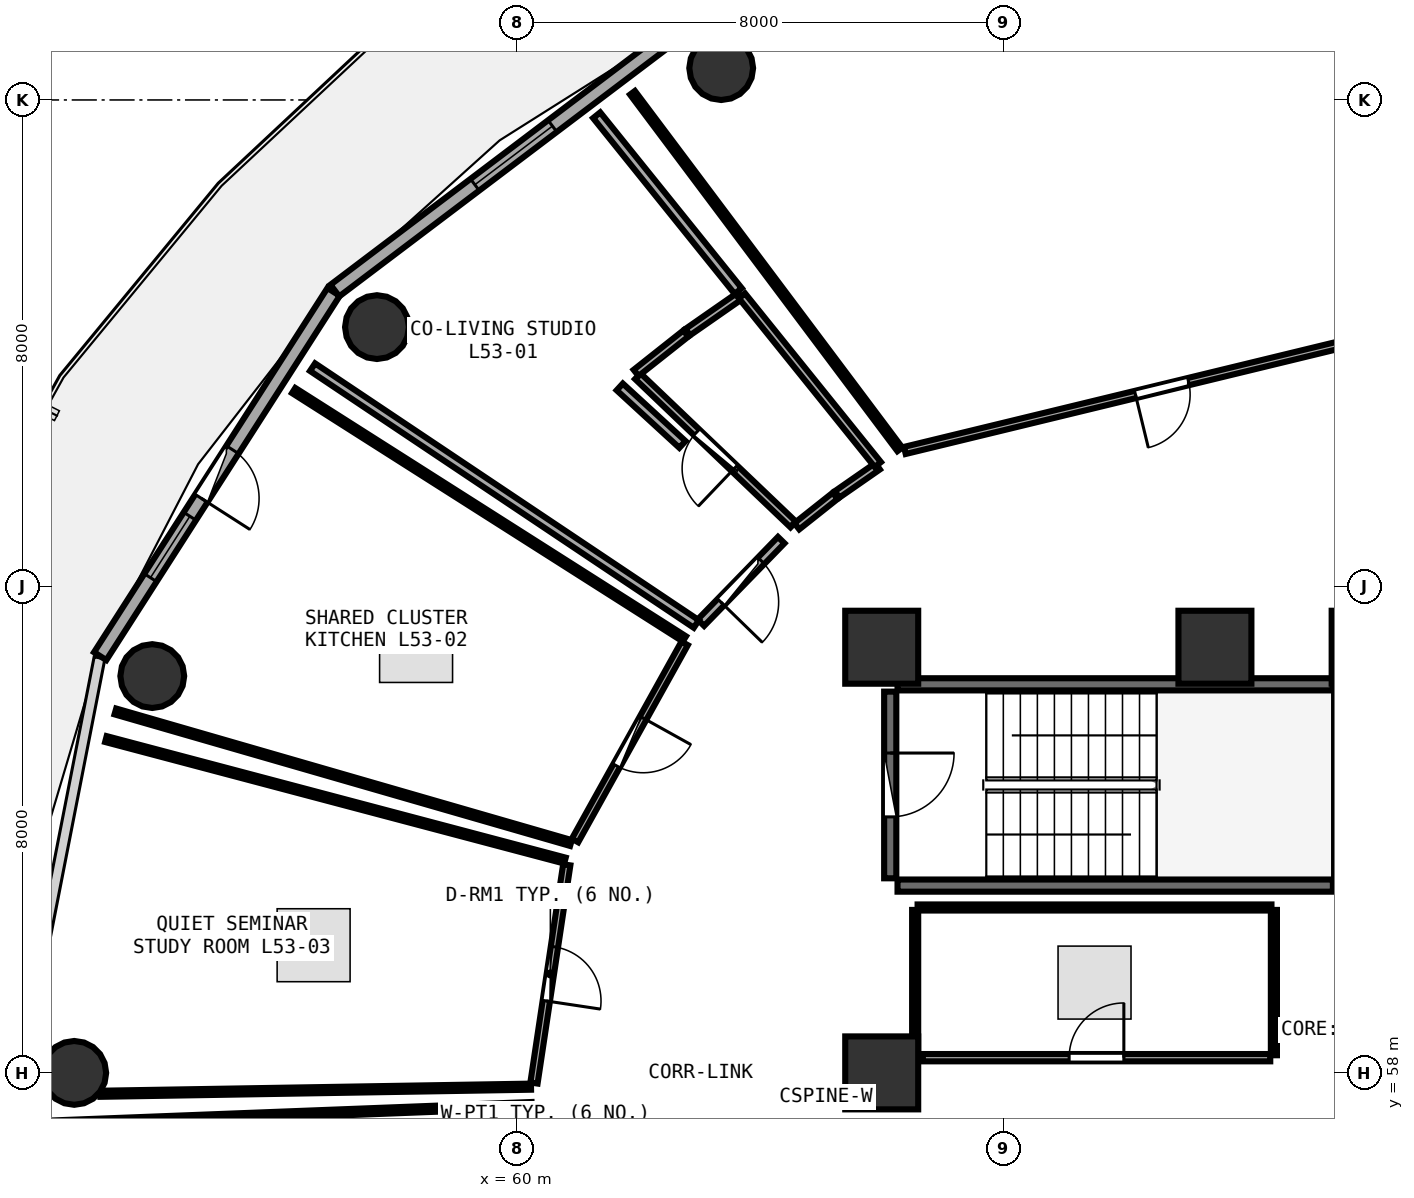
"""IFC4 building model, lengths in metres.
Left out: names, types, materials, properties, quantities, classifications, styles, units other than length and angle.
Written with IfcOpenShell. Run it as: python <this file> out.ifc"""

import sys

from ifc_helpers import new_model, si_unit, direction, frame, frame_2d, origin, origin_2d, place, context, subcontext, project, spatial, rectangle, circle, extrude, element, fill, save


model = new_model("IFC4")
c1 = context("Model", 3, precision=1e-05, world=origin(), true_north=direction((0.0, 1.0)))
c2 = subcontext(c1, "Body", "Model", "MODEL_VIEW")
j1 = project(units=[si_unit("LENGTHUNIT", "METRE"), si_unit("PLANEANGLEUNIT", "RADIAN")], contexts=[c1])
p1 = place(None, origin())
s1 = spatial("IfcSite", under=j1, at=p1, CompositionType="ELEMENT")
p2 = place(p1, origin())
s2 = spatial("IfcBuilding", under=s1, at=p2, CompositionType="ELEMENT")
p3 = place(p2, frame((0.0, 0.0, 208.2)))
s3 = spatial("IfcBuildingStorey", under=s2, at=p3, CompositionType="ELEMENT", Elevation=208.2)
for number, where, z_axis, x_axis in (
    (1, (74.0, 65.0, 0.0), (0.0, 0.0, 1.0), (1.0, 0.0, 0.0)),
    (2, (71.48, 65.0, 0.0), (0.0, 0.0, 1.0), (1.0, 0.0, 0.0)),
    (3, (66.0, 65.0, 0.0), (0.0, 0.0, 1.0), (1.0, 0.0, 0.0)),
    (4, (66.0, 58.0, 0.0), (0.0, 0.0, 1.0), (1.0, 0.0, 0.0)),
):
    element("IfcColumn", number, at=place(p3, frame(where, z_axis=z_axis, x_axis=x_axis)), inside=s3, PredefinedType="PILASTER", context=c2, shape_type="SweptSolid", body=[
        extrude(rectangle(XDim=1.2, YDim=1.2, at=origin_2d()), origin(), (0.0, 0.0, 1.0), 3.75),
    ])
for number, where, z_axis, x_axis in (
    (5, (63.36, 74.524, 0.0), (0.0, 0.0, 1.0), (1.0, 0.0, 0.0)),
    (6, (57.698, 70.264, 0.0), (0.0, 0.0, 1.0), (1.0, 0.0, 0.0)),
    (7, (54.003, 64.526, 0.0), (0.0, 0.0, 1.0), (1.0, 0.0, 0.0)),
    (8, (52.72, 58.0, 0.0), (0.0, 0.0, 1.0), (1.0, 0.0, 0.0)),
):
    element("IfcColumn", number, at=place(p3, frame(where, z_axis=z_axis, x_axis=x_axis)), inside=s3, PredefinedType="COLUMN", context=c2, shape_type="SweptSolid", body=[
        extrude(circle(Radius=0.525, at=origin_2d()), origin(), (0.0, 0.0, 1.0), 3.75),
    ])
p4 = place(p3, frame((62.888, 75.312, 0.0), z_axis=(0.0, 0.0, 1.0), x_axis=(-0.797701674595, -0.603052268338, 0.0)))
e9 = element("IfcWall", 9, at=p4, inside=s3, PredefinedType="SOLIDWALL", context=c2, shape_type="SweptSolid", body=[
    extrude(rectangle(XDim=7.374, YDim=0.24, at=frame_2d((3.687, 0.0))), origin(), (0.0, 0.0, 1.0), 3.475),
])
p5 = place(p4, frame((2.887, 0.0, 0.85)))
e10 = element("IfcOpeningElement", 10, at=p5, cuts=e9, PredefinedType="OPENING", context=c2, shape_type="SweptSolid", body=[
    extrude(rectangle(XDim=1.6, YDim=1.45, at=frame_2d((0.8, 0.725))), frame((0.0, 0.13, 0.0), z_axis=(0.0, -1.0, 0.0), x_axis=(1.0, 0.0, 0.0)), (0.0, 0.0, 1.0), 0.26),
])
p6 = place(p3, frame((56.986, 70.843, 0.0), z_axis=(0.0, 0.0, 1.0), x_axis=(-0.539539512973, -0.841960280501, 0.0)))
e11 = element("IfcWall", 11, at=p6, inside=s3, PredefinedType="SOLIDWALL", context=c2, shape_type="SweptSolid", body=[
    extrude(rectangle(XDim=7.115, YDim=0.24, at=frame_2d((3.557, 0.0))), origin(), (0.0, 0.0, 1.0), 3.475),
])
p7 = place(p6, frame((3.082, 0.0, 0.0)))
e12 = element("IfcOpeningElement", 12, at=p7, cuts=e11, PredefinedType="OPENING", context=c2, shape_type="SweptSolid", body=[
    extrude(rectangle(XDim=0.95, YDim=2.1, at=frame_2d((0.475, 1.05))), frame((0.0, 0.13, 0.0), z_axis=(0.0, -1.0, 0.0), x_axis=(1.0, 0.0, 0.0)), (0.0, 0.0, 1.0), 0.26),
])
p8 = place(p6, frame((4.382, 0.0, 0.85)))
e13 = element("IfcOpeningElement", 13, at=p8, cuts=e11, PredefinedType="OPENING", context=c2, shape_type="SweptSolid", body=[
    extrude(rectangle(XDim=1.2, YDim=1.45, at=frame_2d((0.6, 0.725))), frame((0.0, 0.13, 0.0), z_axis=(0.0, -1.0, 0.0), x_axis=(1.0, 0.0, 0.0)), (0.0, 0.0, 1.0), 0.26),
])
p9 = place(p3, frame((51.803, 57.985, 0.0), z_axis=(0.0, 0.0, 1.0), x_axis=(0.192069055673, -0.981381413036, 0.0)))
e14 = element("IfcWall", 14, at=p9, inside=s3, PredefinedType="SOLIDWALL", context=c2, shape_type="SweptSolid", body=[
    extrude(rectangle(XDim=6.94, YDim=0.24, at=frame_2d((3.47, 0.0))), origin(), (0.0, 0.0, 1.0), 3.475),
])
p10 = place(p9, frame((2.67, 0.0, 0.85)))
e15 = element("IfcOpeningElement", 15, at=p10, cuts=e14, PredefinedType="OPENING", context=c2, shape_type="SweptSolid", body=[
    extrude(rectangle(XDim=1.6, YDim=1.45, at=frame_2d((0.8, 0.725))), frame((0.0, 0.13, 0.0), z_axis=(0.0, -1.0, 0.0), x_axis=(1.0, 0.0, 0.0)), (0.0, 0.0, 1.0), 0.26),
])
p11 = place(p3, frame((66.26, 61.08, 0.0), z_axis=(0.0, 0.0, 1.0), x_axis=(1.0, 0.0, 0.0)))
e16 = element("IfcWall", 16, at=p11, inside=s3, PredefinedType="SHEAR", context=c2, shape_type="SweptSolid", body=[
    extrude(rectangle(XDim=7.16, YDim=0.2, at=frame_2d((3.58, 0.0))), origin(), (0.0, 0.0, 1.0), 3.49),
])
p12 = place(p3, frame((73.54, 61.2, 0.0), z_axis=(0.0, 0.0, 1.0), x_axis=(0.0, 1.0, 0.0)))
e17 = element("IfcWall", 17, at=p12, inside=s3, PredefinedType="SHEAR", context=c2, shape_type="SweptSolid", body=[
    extrude(rectangle(XDim=3.07, YDim=0.2, at=frame_2d((1.535, 0.0))), origin(), (0.0, 0.0, 1.0), 3.49),
])
p13 = place(p3, frame((73.42, 64.39, 0.0), z_axis=(0.0, 0.0, 1.0), x_axis=(-1.0, 0.0, 0.0)))
e18 = element("IfcWall", 18, at=p13, inside=s3, PredefinedType="SHEAR", context=c2, shape_type="SweptSolid", body=[
    extrude(rectangle(XDim=7.16, YDim=0.2, at=frame_2d((3.58, 0.0))), origin(), (0.0, 0.0, 1.0), 3.49),
])
p14 = place(p3, frame((66.14, 64.27, 0.0), z_axis=(0.0, 0.0, 1.0), x_axis=(0.0, -1.0, 0.0)))
e19 = element("IfcWall", 19, at=p14, inside=s3, PredefinedType="SHEAR", context=c2, shape_type="SweptSolid", body=[
    extrude(rectangle(XDim=3.07, YDim=0.2, at=frame_2d((1.535, 0.0))), origin(), (0.0, 0.0, 1.0), 3.49),
])
p15 = place(p14, frame((1.01, 0.0, 0.0)))
e20 = element("IfcOpeningElement", 20, at=p15, cuts=e19, PredefinedType="OPENING", context=c2, shape_type="SweptSolid", body=[
    extrude(rectangle(XDim=1.05, YDim=2.1, at=frame_2d((0.525, 1.05))), frame((0.0, 0.11, 0.0), z_axis=(0.0, -1.0, 0.0), x_axis=(1.0, 0.0, 0.0)), (0.0, 0.0, 1.0), 0.22),
])
p16 = place(p3, frame((66.675, 58.25, 0.0), z_axis=(0.0, 0.0, 1.0), x_axis=(1.0, 0.0, 0.0)))
e21 = element("IfcWall", 21, at=p16, inside=s3, PredefinedType="PARTITIONING", context=c2, shape_type="SweptSolid", body=[
    extrude(rectangle(XDim=5.715, YDim=0.12, at=frame_2d((2.857, 0.0))), origin(), (0.0, 0.0, 1.0), 3.48),
])
p17 = place(p16, frame((2.407, 0.0, 0.0)))
e22 = element("IfcOpeningElement", 22, at=p17, cuts=e21, PredefinedType="OPENING", context=c2, shape_type="SweptSolid", body=[
    extrude(rectangle(XDim=0.9, YDim=2.08, at=frame_2d((0.45, 1.04))), frame((0.0, 0.07, 0.0), z_axis=(0.0, -1.0, 0.0), x_axis=(1.0, 0.0, 0.0)), (0.0, 0.0, 1.0), 0.14),
])
p18 = place(p3, frame((74.84, 70.29, 0.0), z_axis=(0.0, 0.0, 1.0), x_axis=(-0.971771434763, -0.235924306884, 0.0)))
e23 = element("IfcWall", 23, at=p18, inside=s3, PredefinedType="PARTITIONING", context=c2, shape_type="SweptSolid", body=[
    extrude(rectangle(XDim=8.705, YDim=0.12, at=frame_2d((4.353, 0.0))), origin(), (0.0, 0.0, 1.0), 3.025),
])
p19 = place(p18, frame((3.903, 0.0, 0.0)))
e24 = element("IfcOpeningElement", 24, at=p19, cuts=e23, PredefinedType="OPENING", context=c2, shape_type="SweptSolid", body=[
    extrude(rectangle(XDim=0.9, YDim=2.08, at=frame_2d((0.45, 1.04))), frame((0.0, 0.07, 0.0), z_axis=(0.0, -1.0, 0.0), x_axis=(1.0, 0.0, 0.0)), (0.0, 0.0, 1.0), 0.14),
])
p20 = place(p3, frame((64.545, 67.018, 0.0), z_axis=(0.0, 0.0, 1.0), x_axis=(-0.723495138875, 0.690329474979, 0.0)))
e25 = element("IfcWall", 25, at=p20, inside=s3, PredefinedType="PLUMBINGWALL", context=c2, shape_type="SweptSolid", body=[
    extrude(rectangle(XDim=3.533, YDim=0.13, at=frame_2d((1.767, 0.0))), origin(), (0.0, 0.0, 1.0), 3.175),
])
p21 = place(p20, frame((1.337, 0.0, 0.0)))
e26 = element("IfcOpeningElement", 26, at=p21, cuts=e25, PredefinedType="OPENING", context=c2, shape_type="SweptSolid", body=[
    extrude(rectangle(XDim=0.86, YDim=2.05, at=frame_2d((0.43, 1.025))), frame((0.0, 0.075, 0.0), z_axis=(0.0, -1.0, 0.0), x_axis=(1.0, 0.0, 0.0)), (0.0, 0.0, 1.0), 0.15),
])
p22 = place(p3, frame((64.347, 66.762, 0.0), z_axis=(0.0, 0.0, 1.0), x_axis=(-0.697118859216, -0.716955574722, 0.0)))
e27 = element("IfcWall", 27, at=p22, inside=s3, PredefinedType="PARTITIONING", context=c2, shape_type="SweptSolid", body=[
    extrude(rectangle(XDim=1.895, YDim=0.15, at=frame_2d((0.948, 0.0))), origin(), (0.0, 0.0, 1.0), 3.025),
])
p23 = place(p22, frame((0.473, 0.0, 0.0)))
e28 = element("IfcOpeningElement", 28, at=p23, cuts=e27, PredefinedType="OPENING", context=c2, shape_type="SweptSolid", body=[
    extrude(rectangle(XDim=0.95, YDim=2.08, at=frame_2d((0.475, 1.04))), frame((0.0, 0.085, 0.0), z_axis=(0.0, -1.0, 0.0), x_axis=(1.0, 0.0, 0.0)), (0.0, 0.0, 1.0), 0.17),
])
p24 = place(p3, frame((62.759, 65.064, 0.0), z_axis=(0.0, 0.0, 1.0), x_axis=(-0.485877595764, -0.874026865683, 0.0)))
e29 = element("IfcWall", 29, at=p24, inside=s3, PredefinedType="PARTITIONING", context=c2, shape_type="SweptSolid", body=[
    extrude(rectangle(XDim=3.71, YDim=0.12, at=frame_2d((1.855, 0.0))), origin(), (0.0, 0.0, 1.0), 3.025),
])
p25 = place(p24, frame((1.405, 0.0, 0.0)))
e30 = element("IfcOpeningElement", 30, at=p25, cuts=e29, PredefinedType="OPENING", context=c2, shape_type="SweptSolid", body=[
    extrude(rectangle(XDim=0.9, YDim=2.08, at=frame_2d((0.45, 1.04))), frame((0.0, 0.07, 0.0), z_axis=(0.0, -1.0, 0.0), x_axis=(1.0, 0.0, 0.0)), (0.0, 0.0, 1.0), 0.14),
])
p26 = place(p3, frame((60.82, 61.422, 0.0), z_axis=(0.0, 0.0, 1.0), x_axis=(-0.148557592641, -0.988903757536, 0.0)))
e31 = element("IfcWall", 31, at=p26, inside=s3, PredefinedType="PARTITIONING", context=c2, shape_type="SweptSolid", body=[
    extrude(rectangle(XDim=3.629, YDim=0.12, at=frame_2d((1.814, 0.0))), origin(), (0.0, 0.0, 1.0), 3.025),
])
p27 = place(p26, frame((1.364, 0.0, 0.0)))
e32 = element("IfcOpeningElement", 32, at=p27, cuts=e31, PredefinedType="OPENING", context=c2, shape_type="SweptSolid", body=[
    extrude(rectangle(XDim=0.9, YDim=2.08, at=frame_2d((0.45, 1.04))), frame((0.0, 0.07, 0.0), z_axis=(0.0, -1.0, 0.0), x_axis=(1.0, 0.0, 0.0)), (0.0, 0.0, 1.0), 0.14),
])
p28 = place(p3, frame((60.296, 57.414, 0.0), z_axis=(0.0, 0.0, 1.0), x_axis=(0.214769597133, -0.976664742963, 0.0)))
e33 = element("IfcWall", 33, at=p28, inside=s3, PredefinedType="PARTITIONING", context=c2, shape_type="SweptSolid", body=[
    extrude(rectangle(XDim=3.638, YDim=0.12, at=frame_2d((1.819, 0.0))), origin(), (0.0, 0.0, 1.0), 3.48),
])
p29 = place(p28, frame((1.369, 0.0, 0.0)))
e34 = element("IfcOpeningElement", 34, at=p29, cuts=e33, PredefinedType="OPENING", context=c2, shape_type="SweptSolid", body=[
    extrude(rectangle(XDim=0.9, YDim=2.08, at=frame_2d((0.45, 1.04))), frame((0.0, 0.07, 0.0), z_axis=(0.0, -1.0, 0.0), x_axis=(1.0, 0.0, 0.0)), (0.0, 0.0, 1.0), 0.14),
])
p30 = place(p3, frame((72.45, 58.29, 0.0), z_axis=(0.0, 0.0, 1.0), x_axis=(0.0, 1.0, 0.0)))
e35 = element("IfcWall", 35, at=p30, inside=s3, PredefinedType="PARTITIONING", context=c2, shape_type="SweptSolid", body=[
    extrude(rectangle(XDim=2.39, YDim=0.1, at=frame_2d((1.195, 0.0))), origin(), (0.0, 0.0, 1.0), 3.48),
])
p31 = place(p3, frame((72.41, 60.72, 0.0), z_axis=(0.0, 0.0, 1.0), x_axis=(-1.0, 0.0, 0.0)))
e36 = element("IfcWall", 36, at=p31, inside=s3, PredefinedType="PARTITIONING", context=c2, shape_type="SweptSolid", body=[
    extrude(rectangle(XDim=5.82, YDim=0.1, at=frame_2d((2.91, 0.0))), origin(), (0.0, 0.0, 1.0), 3.48),
])
p32 = place(p3, frame((66.55, 60.68, 0.0), z_axis=(0.0, 0.0, 1.0), x_axis=(0.0, -1.0, 0.0)))
e37 = element("IfcWall", 37, at=p32, inside=s3, PredefinedType="PARTITIONING", context=c2, shape_type="SweptSolid", body=[
    extrude(rectangle(XDim=2.383, YDim=0.1, at=frame_2d((1.191, 0.0))), origin(), (0.0, 0.0, 1.0), 3.48),
])
p33 = place(p3, frame((66.298, 68.254, 0.0), z_axis=(0.0, 0.0, 1.0), x_axis=(-0.599930714763, 0.80005195924, 0.0)))
e38 = element("IfcWall", 38, at=p33, inside=s3, PredefinedType="PARTITIONING", context=c2, shape_type="SweptSolid", body=[
    extrude(rectangle(XDim=7.33, YDim=0.1, at=frame_2d((3.665, 0.0))), origin(), (0.0, 0.0, 1.0), 3.025),
])
p34 = place(p3, frame((65.933, 67.977, 0.0), z_axis=(0.0, 0.0, 1.0), x_axis=(-0.821107527055, -0.570773535663, 0.0)))
e39 = element("IfcWall", 39, at=p34, inside=s3, PredefinedType="PLUMBINGWALL", context=c2, shape_type="SweptSolid", body=[
    extrude(rectangle(XDim=0.812, YDim=0.13, at=frame_2d((0.406, 0.0))), origin(), (0.0, 0.0, 1.0), 3.025),
])
p35 = place(p3, frame((65.234, 67.49, 0.0), z_axis=(0.0, 0.0, 1.0), x_axis=(-0.783584251465, -0.621285538908, 0.0)))
e40 = element("IfcWall", 40, at=p35, inside=s3, PredefinedType="PLUMBINGWALL", context=c2, shape_type="SweptSolid", body=[
    extrude(rectangle(XDim=0.805, YDim=0.13, at=frame_2d((0.402, 0.0))), origin(), (0.0, 0.0, 1.0), 3.025),
])
p36 = place(p3, frame((61.961, 69.511, 0.0), z_axis=(0.0, 0.0, 1.0), x_axis=(0.784079055359, 0.620660966186, 0.0)))
e41 = element("IfcWall", 41, at=p36, inside=s3, PredefinedType="PLUMBINGWALL", context=c2, shape_type="SweptSolid", body=[
    extrude(rectangle(XDim=1.043, YDim=0.13, at=frame_2d((0.521, 0.0))), origin(), (0.0, 0.0, 1.0), 3.48),
])
p37 = place(p3, frame((62.81, 70.182, 0.0), z_axis=(0.0, 0.0, 1.0), x_axis=(0.820692025527, 0.571370807127, 0.0)))
e42 = element("IfcWall", 42, at=p37, inside=s3, PredefinedType="PLUMBINGWALL", context=c2, shape_type="SweptSolid", body=[
    extrude(rectangle(XDim=1.051, YDim=0.13, at=frame_2d((0.525, 0.0))), origin(), (0.0, 0.0, 1.0), 3.48),
])
p38 = place(p3, frame((63.701, 70.778, 0.0), z_axis=(0.0, 0.0, 1.0), x_axis=(0.627323766187, -0.778758558461, 0.0)))
e43 = element("IfcWall", 43, at=p38, inside=s3, PredefinedType="PLUMBINGWALL", context=c2, shape_type="SweptSolid", body=[
    extrude(rectangle(XDim=3.563, YDim=0.13, at=frame_2d((1.781, 0.0))), origin(), (0.0, 0.0, 1.0), 3.025),
])
p39 = place(p3, frame((62.951, 65.382, 0.0), z_axis=(0.0, 0.0, 1.0), x_axis=(-0.831079650143, 0.556153409697, 0.0)))
e44 = element("IfcWall", 44, at=p39, inside=s3, PredefinedType="PARTITIONING", context=c2, shape_type="SweptSolid", body=[
    extrude(rectangle(XDim=7.594, YDim=0.15, at=frame_2d((3.797, 0.0))), origin(), (0.0, 0.0, 1.0), 3.075),
])
p40 = place(p3, frame((61.312, 73.749, 0.0), z_axis=(0.0, 0.0, 1.0), x_axis=(0.627090198143, -0.778946649901, 0.0)))
e45 = element("IfcWall", 45, at=p40, inside=s3, PredefinedType="PARTITIONING", context=c2, shape_type="SweptSolid", body=[
    extrude(rectangle(XDim=3.712, YDim=0.15, at=frame_2d((1.856, 0.0))), origin(), (0.0, 0.0, 1.0), 3.075),
])
p41 = place(p3, frame((61.691, 69.281, 0.0), z_axis=(0.0, 0.0, 1.0), x_axis=(0.736726740779, -0.676190586611, 0.0)))
e46 = element("IfcWall", 46, at=p41, inside=s3, PredefinedType="PARTITIONING", context=c2, shape_type="SweptSolid", body=[
    extrude(rectangle(XDim=1.399, YDim=0.15, at=frame_2d((0.7, 0.0))), origin(), (0.0, 0.0, 1.0), 3.175),
])
p42 = place(p3, frame((60.889, 61.78, 0.0), z_axis=(0.0, 0.0, 1.0), x_axis=(-0.960734399679, 0.277469661899, 0.0)))
e47 = element("IfcWall", 47, at=p42, inside=s3, PredefinedType="PARTITIONING", context=c2, shape_type="SweptSolid", body=[
    extrude(rectangle(XDim=7.798, YDim=0.1, at=frame_2d((3.899, 0.0))), origin(), (0.0, 0.0, 1.0), 3.075),
])
p43 = place(p3, frame((56.329, 69.221, 0.0), z_axis=(0.0, 0.0, 1.0), x_axis=(0.843949218332, -0.536423076383, 0.0)))
e48 = element("IfcWall", 48, at=p43, inside=s3, PredefinedType="PARTITIONING", context=c2, shape_type="SweptSolid", body=[
    extrude(rectangle(XDim=7.613, YDim=0.1, at=frame_2d((3.807, 0.0))), origin(), (0.0, 0.0, 1.0), 3.075),
])
p44 = place(p3, frame((60.232, 57.773, 0.0), z_axis=(0.0, 0.0, 1.0), x_axis=(-0.999864271248, -0.016475408379, 0.0)))
e49 = element("IfcWall", 49, at=p44, inside=s3, PredefinedType="PARTITIONING", context=c2, shape_type="SweptSolid", body=[
    extrude(rectangle(XDim=7.083, YDim=0.1, at=frame_2d((3.542, 0.0))), origin(), (0.0, 0.0, 1.0), 3.175),
])
p45 = place(p3, frame((53.241, 63.49, 0.0), z_axis=(0.0, 0.0, 1.0), x_axis=(0.966701361123, -0.25590716755, 0.0)))
e50 = element("IfcWall", 50, at=p45, inside=s3, PredefinedType="PARTITIONING", context=c2, shape_type="SweptSolid", body=[
    extrude(rectangle(XDim=7.81, YDim=0.1, at=frame_2d((3.905, 0.0))), origin(), (0.0, 0.0, 1.0), 3.075),
])
p46 = place(p3, frame((52.38, 57.168, 0.0), z_axis=(0.0, 0.0, 1.0), x_axis=(0.999258468257, 0.038503423452, 0.0)))
e51 = element("IfcWall", 51, at=p46, inside=s3, PredefinedType="PARTITIONING", context=c2, shape_type="SweptSolid", body=[
    extrude(rectangle(XDim=7.869, YDim=0.1, at=frame_2d((3.935, 0.0))), origin(), (0.0, 0.0, 1.0), 3.075),
])
p47 = place(p5, origin())
e52 = element("IfcWindow", 52, at=p47, inside=s3, PartitioningType="SINGLE_PANEL", PredefinedType="WINDOW", context=c2, shape_type="SweptSolid", body=[
    extrude(rectangle(XDim=1.6, YDim=1.45, at=frame_2d((0.8, 0.725))), frame((0.0, 0.03, 0.0), z_axis=(0.0, -1.0, 0.0), x_axis=(1.0, 0.0, 0.0)), (0.0, 0.0, 1.0), 0.06),
])
fill(e10, e52)
p48 = place(p7, frame((0.95, 0.0, 0.0), z_axis=(0.0, 0.0, 1.0), x_axis=(-1.0, 0.0, 0.0)))
e53 = element("IfcDoor", 53, at=p48, inside=s3, OperationType="SINGLE_SWING_LEFT", PredefinedType="DOOR", context=c2, shape_type="SweptSolid", body=[
    extrude(rectangle(XDim=0.95, YDim=2.1, at=frame_2d((0.475, 1.05))), frame((0.0, 0.025, 0.0), z_axis=(0.0, -1.0, 0.0), x_axis=(1.0, 0.0, 0.0)), (0.0, 0.0, 1.0), 0.05),
])
fill(e12, e53)
p49 = place(p8, origin())
e54 = element("IfcWindow", 54, at=p49, inside=s3, PartitioningType="SINGLE_PANEL", PredefinedType="WINDOW", context=c2, shape_type="SweptSolid", body=[
    extrude(rectangle(XDim=1.2, YDim=1.45, at=frame_2d((0.6, 0.725))), frame((0.0, 0.03, 0.0), z_axis=(0.0, -1.0, 0.0), x_axis=(1.0, 0.0, 0.0)), (0.0, 0.0, 1.0), 0.06),
])
fill(e13, e54)
p50 = place(p15, origin())
e55 = element("IfcDoor", 55, at=p50, inside=s3, OperationType="SINGLE_SWING_LEFT", PredefinedType="DOOR", context=c2, shape_type="SweptSolid", body=[
    extrude(rectangle(XDim=1.05, YDim=2.1, at=frame_2d((0.525, 1.05))), frame((0.0, 0.025, 0.0), z_axis=(0.0, -1.0, 0.0), x_axis=(1.0, 0.0, 0.0)), (0.0, 0.0, 1.0), 0.05),
])
fill(e20, e55)
p51 = place(p17, origin())
e56 = element("IfcDoor", 56, at=p51, inside=s3, OperationType="SINGLE_SWING_RIGHT", PredefinedType="DOOR", context=c2, shape_type="SweptSolid", body=[
    extrude(rectangle(XDim=0.9, YDim=2.08, at=frame_2d((0.45, 1.04))), frame((0.0, 0.025, 0.0), z_axis=(0.0, -1.0, 0.0), x_axis=(1.0, 0.0, 0.0)), (0.0, 0.0, 1.0), 0.05),
])
fill(e22, e56)
p52 = place(p19, origin())
e57 = element("IfcDoor", 57, at=p52, inside=s3, OperationType="SINGLE_SWING_RIGHT", PredefinedType="DOOR", context=c2, shape_type="SweptSolid", body=[
    extrude(rectangle(XDim=0.9, YDim=2.08, at=frame_2d((0.45, 1.04))), frame((0.0, 0.025, 0.0), z_axis=(0.0, -1.0, 0.0), x_axis=(1.0, 0.0, 0.0)), (0.0, 0.0, 1.0), 0.05),
])
fill(e24, e57)
p53 = place(p21, origin())
e58 = element("IfcDoor", 58, at=p53, inside=s3, OperationType="SINGLE_SWING_LEFT", PredefinedType="DOOR", context=c2, shape_type="SweptSolid", body=[
    extrude(rectangle(XDim=0.86, YDim=2.05, at=frame_2d((0.43, 1.025))), frame((0.0, 0.025, 0.0), z_axis=(0.0, -1.0, 0.0), x_axis=(1.0, 0.0, 0.0)), (0.0, 0.0, 1.0), 0.05),
])
fill(e26, e58)
p54 = place(p23, origin())
e59 = element("IfcDoor", 59, at=p54, inside=s3, OperationType="SINGLE_SWING_RIGHT", PredefinedType="DOOR", context=c2, shape_type="SweptSolid", body=[
    extrude(rectangle(XDim=0.95, YDim=2.08, at=frame_2d((0.475, 1.04))), frame((0.0, 0.025, 0.0), z_axis=(0.0, -1.0, 0.0), x_axis=(1.0, 0.0, 0.0)), (0.0, 0.0, 1.0), 0.05),
])
fill(e28, e59)
p55 = place(p25, origin())
e60 = element("IfcDoor", 60, at=p55, inside=s3, OperationType="SINGLE_SWING_LEFT", PredefinedType="DOOR", context=c2, shape_type="SweptSolid", body=[
    extrude(rectangle(XDim=0.9, YDim=2.08, at=frame_2d((0.45, 1.04))), frame((0.0, 0.025, 0.0), z_axis=(0.0, -1.0, 0.0), x_axis=(1.0, 0.0, 0.0)), (0.0, 0.0, 1.0), 0.05),
])
fill(e30, e60)
p56 = place(p27, origin())
e61 = element("IfcDoor", 61, at=p56, inside=s3, OperationType="SINGLE_SWING_RIGHT", PredefinedType="DOOR", context=c2, shape_type="SweptSolid", body=[
    extrude(rectangle(XDim=0.9, YDim=2.08, at=frame_2d((0.45, 1.04))), frame((0.0, 0.025, 0.0), z_axis=(0.0, -1.0, 0.0), x_axis=(1.0, 0.0, 0.0)), (0.0, 0.0, 1.0), 0.05),
])
fill(e32, e61)
save(model, sys.argv[1])
